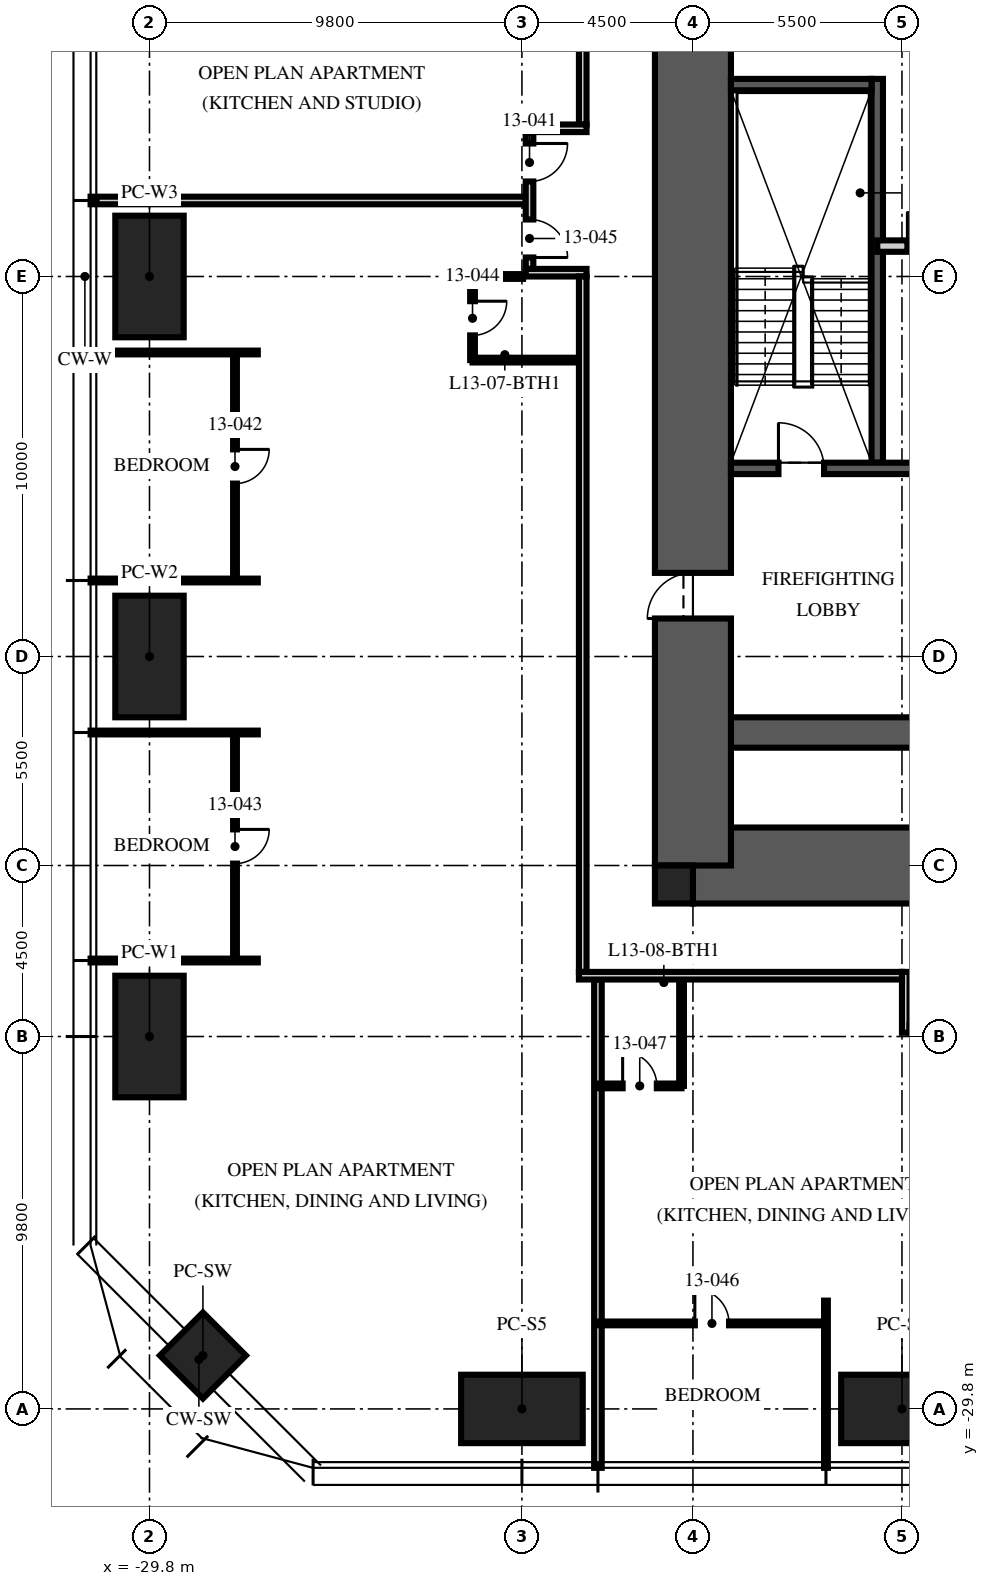
"""IFC4 building model, lengths in metres.
Left out: names, types, materials, properties, quantities, classifications, styles, units other than length and angle.
Written with IfcOpenShell. Run it as: python <this file> out.ifc"""

import sys

from ifc_helpers import new_model, si_unit, direction, frame, frame_2d, origin, origin_2d, place, context, subcontext, project, spatial, rectangle, hollow_rectangle, extrude, element, fill, save


model = new_model("IFC4")
c1 = context("Model", 3, precision=1e-05, world=origin(), true_north=direction((0.0, 1.0)))
c2 = subcontext(c1, "Body", "Model", "MODEL_VIEW")
j1 = project(units=[si_unit("LENGTHUNIT", "METRE"), si_unit("PLANEANGLEUNIT", "RADIAN")], contexts=[c1])
p1 = place(None, origin())
s1 = spatial("IfcSite", under=j1, at=p1, CompositionType="ELEMENT")
p2 = place(p1, origin())
s2 = spatial("IfcBuilding", under=s1, at=p2, CompositionType="ELEMENT")
p3 = place(p2, frame((0.0, 0.0, 54.75)))
s3 = spatial("IfcBuildingStorey", under=s2, at=p3, CompositionType="ELEMENT", Elevation=54.75)
p4 = place(p3, frame((-15.5, -15.5, -0.25), z_axis=(0.0, 0.0, 1.0), x_axis=(1.0, 0.0, 0.0)))
e1 = element("IfcWall", 1, at=p4, inside=s3, PredefinedType="SHEAR", context=c2, shape_type="SweptSolid", body=[
    extrude(rectangle(XDim=31.0, YDim=2.0, at=frame_2d((15.5, 0.0))), origin(), (0.0, 0.0, 1.0), 3.75),
])
p5 = place(p3, frame((-15.5, -12.0, -0.25), z_axis=(0.0, 0.0, 1.0), x_axis=(1.0, 0.0, 0.0)))
e2 = element("IfcWall", 2, at=p5, inside=s3, PredefinedType="SHEAR", context=c2, shape_type="SweptSolid", body=[
    extrude(rectangle(XDim=31.0, YDim=0.8, at=frame_2d((15.5, 0.0))), origin(), (0.0, 0.0, 1.0), 3.75),
])
p6 = place(p3, frame((-15.5, -15.5, -0.25), z_axis=(0.0, 0.0, 1.0), x_axis=(0.0, 1.0, 0.0)))
e3 = element("IfcWall", 3, at=p6, inside=s3, PredefinedType="SHEAR", context=c2, shape_type="SweptSolid", body=[
    extrude(rectangle(XDim=31.0, YDim=2.0, at=frame_2d((15.5, 0.0))), origin(), (0.0, 0.0, 1.0), 3.75),
])
p7 = place(p6, frame((6.5, 0.0, 0.25)))
e4 = element("IfcOpeningElement", 4, at=p7, cuts=e3, PredefinedType="OPENING", context=c2, shape_type="SweptSolid", body=[
    extrude(rectangle(XDim=1.2, YDim=2.1, at=frame_2d((0.6, 1.05))), frame((0.0, 1.01, 0.0), z_axis=(0.0, -1.0, 0.0), x_axis=(1.0, 0.0, 0.0)), (0.0, 0.0, 1.0), 2.02),
])
p8 = place(p6, frame((23.0, 0.0, 0.25)))
e5 = element("IfcOpeningElement", 5, at=p8, cuts=e3, PredefinedType="OPENING", context=c2, shape_type="SweptSolid", body=[
    extrude(rectangle(XDim=1.8, YDim=2.1, at=frame_2d((0.9, 1.05))), frame((0.0, 1.01, 0.0), z_axis=(0.0, -1.0, 0.0), x_axis=(1.0, 0.0, 0.0)), (0.0, 0.0, 1.0), 2.02),
])
p9 = place(p3, frame((-16.0, -16.0, -0.25), z_axis=(0.0, 0.0, 1.0), x_axis=(1.0, 0.0, 0.0)))
e6 = element("IfcColumn", 6, at=p9, inside=s3, PredefinedType="COLUMN", context=c2, shape_type="SweptSolid", body=[
    extrude(rectangle(XDim=1.0, YDim=1.0, at=origin_2d()), origin(), (0.0, 0.0, 1.0), 3.75),
])
for number, where, z_axis, x_axis in (
    (7, (-10.0, -29.8, 0.0), (0.0, 0.0, 1.0), (1.0, 0.0, 0.0)),
    (8, (-20.0, -29.8, 0.0), (0.0, 0.0, 1.0), (1.0, 0.0, 0.0)),
    (9, (-29.8, -20.0, 0.0), (0.0, 0.0, 1.0), (0.0, 1.0, 0.0)),
    (10, (-29.8, -10.0, 0.0), (0.0, 0.0, 1.0), (0.0, 1.0, 0.0)),
    (11, (-29.8, 0.0, 0.0), (0.0, 0.0, 1.0), (0.0, 1.0, 0.0)),
):
    element("IfcColumn", number, at=place(p3, frame(where, z_axis=z_axis, x_axis=x_axis)), inside=s3, PredefinedType="COLUMN", context=c2, shape_type="SweptSolid", body=[
        extrude(hollow_rectangle(XDim=3.2, YDim=1.8, WallThickness=0.2, at=origin_2d()), origin(), (0.0, 0.0, 1.0), 3.75),
    ])
p10 = place(p3, frame((-28.394, -28.394, 0.0), z_axis=(0.0, 0.0, 1.0), x_axis=(0.707106781187, -0.707106781187, 0.0)))
e12 = element("IfcColumn", 12, at=p10, inside=s3, PredefinedType="COLUMN", context=c2, shape_type="SweptSolid", body=[
    extrude(hollow_rectangle(XDim=1.6, YDim=1.6, WallThickness=0.1, at=origin_2d()), origin(), (0.0, 0.0, 1.0), 3.75),
])
p11 = place(p3, frame((-10.65, -4.9, 0.0), z_axis=(0.0, 0.0, 1.0), x_axis=(0.0, 1.0, 0.0)))
e13 = element("IfcWall", 13, at=p11, inside=s3, PredefinedType="SOLIDWALL", context=c2, shape_type="SweptSolid", body=[
    extrude(rectangle(XDim=10.1, YDim=0.3, at=frame_2d((5.05, 0.0))), origin(), (0.0, 0.0, 1.0), 3.5),
])
p12 = place(p3, frame((-14.5, -5.05, 0.0), z_axis=(0.0, 0.0, 1.0), x_axis=(1.0, 0.0, 0.0)))
e14 = element("IfcWall", 14, at=p12, inside=s3, PredefinedType="SOLIDWALL", context=c2, shape_type="SweptSolid", body=[
    extrude(rectangle(XDim=5.7, YDim=0.3, at=frame_2d((2.85, 0.0))), origin(), (0.0, 0.0, 1.0), 3.5),
])
p13 = place(p12, frame((1.25, 0.0, 0.0)))
e15 = element("IfcOpeningElement", 15, at=p13, cuts=e14, PredefinedType="OPENING", context=c2, shape_type="SweptSolid", body=[
    extrude(rectangle(XDim=1.2, YDim=2.1, at=frame_2d((0.6, 1.05))), frame((0.0, 0.16, 0.0), z_axis=(0.0, -1.0, 0.0), x_axis=(1.0, 0.0, 0.0)), (0.0, 0.0, 1.0), 0.32),
])
p14 = place(p3, frame((-14.5, 5.05, 0.0), z_axis=(0.0, 0.0, 1.0), x_axis=(1.0, 0.0, 0.0)))
e16 = element("IfcWall", 16, at=p14, inside=s3, PredefinedType="SOLIDWALL", context=c2, shape_type="SweptSolid", body=[
    extrude(rectangle(XDim=3.7, YDim=0.3, at=frame_2d((1.85, 0.0))), origin(), (0.0, 0.0, 1.0), 3.5),
])
p15 = place(p3, frame((-10.65, 0.8, 0.0), z_axis=(0.0, 0.0, 1.0), x_axis=(1.0, 0.0, 0.0)))
e17 = element("IfcWall", 17, at=p15, inside=s3, PredefinedType="PARTITIONING", context=c2, shape_type="SweptSolid", body=[
    extrude(rectangle(XDim=21.3, YDim=0.3, at=frame_2d((10.65, 0.0))), origin(), (0.0, 0.0, 1.0), 3.5),
])
p16 = place(p15, frame((10.05, 0.0, 0.0)))
e18 = element("IfcOpeningElement", 18, at=p16, cuts=e17, PredefinedType="OPENING", context=c2, shape_type="SweptSolid", body=[
    extrude(rectangle(XDim=1.2, YDim=2.1, at=frame_2d((0.6, 1.05))), frame((0.0, 0.16, 0.0), z_axis=(0.0, -1.0, 0.0), x_axis=(1.0, 0.0, 0.0)), (0.0, 0.0, 1.0), 0.32),
])
p17 = place(p15, frame((0.793, 0.0, 0.0)))
e19 = element("IfcOpeningElement", 19, at=p17, cuts=e17, PredefinedType="OPENING", context=c2, shape_type="SweptSolid", body=[
    extrude(rectangle(XDim=0.9, YDim=2.1, at=frame_2d((0.45, 1.05))), frame((0.0, 0.16, 0.0), z_axis=(0.0, -1.0, 0.0), x_axis=(1.0, 0.0, 0.0)), (0.0, 0.0, 1.0), 0.32),
])
p18 = place(p3, frame((-19.9, 2.0, 0.0), z_axis=(0.0, 0.0, 1.0), x_axis=(-1.0, 0.0, 0.0)))
e20 = element("IfcWall", 20, at=p18, inside=s3, PredefinedType="PARTITIONING", context=c2, shape_type="SweptSolid", body=[
    extrude(rectangle(XDim=11.45, YDim=0.2, at=frame_2d((5.725, 0.0))), origin(), (0.0, 0.0, 1.0), 2.71),
])
for number, where, z_axis, x_axis in (
    (21, (-26.95, -2.0, 0.0), (0.0, 0.0, 1.0), (-1.0, 0.0, 0.0)),
    (22, (-26.95, -8.0, 0.0), (0.0, 0.0, 1.0), (-1.0, 0.0, 0.0)),
    (23, (-26.95, -12.0, 0.0), (0.0, 0.0, 1.0), (-1.0, 0.0, 0.0)),
    (24, (-26.95, -18.0, 0.0), (0.0, 0.0, 1.0), (-1.0, 0.0, 0.0)),
):
    element("IfcWall", number, at=place(p3, frame(where, z_axis=z_axis, x_axis=x_axis)), inside=s3, PredefinedType="PARTITIONING", context=c2, shape_type="SweptSolid", body=[
        extrude(rectangle(XDim=4.4, YDim=0.1, at=frame_2d((2.2, 0.0))), origin(), (0.0, 0.0, 1.0), 2.71),
    ])
p19 = place(p3, frame((-18.0, -18.5, 0.0), z_axis=(0.0, 0.0, 1.0), x_axis=(0.0, -1.0, 0.0)))
e25 = element("IfcWall", 25, at=p19, inside=s3, PredefinedType="PARTITIONING", context=c2, shape_type="SweptSolid", body=[
    extrude(rectangle(XDim=12.85, YDim=0.2, at=frame_2d((6.425, 0.0))), origin(), (0.0, 0.0, 1.0), 2.3),
])
p20 = place(p3, frame((-12.0, -26.95, 0.0), z_axis=(0.0, 0.0, 1.0), x_axis=(0.0, -1.0, 0.0)))
e26 = element("IfcWall", 26, at=p20, inside=s3, PredefinedType="PARTITIONING", context=c2, shape_type="SweptSolid", body=[
    extrude(rectangle(XDim=4.4, YDim=0.1, at=frame_2d((2.2, 0.0))), origin(), (0.0, 0.0, 1.0), 2.71),
])
p21 = place(p3, frame((-27.55, -2.0, 0.0), z_axis=(0.0, 0.0, 1.0), x_axis=(0.0, -1.0, 0.0)))
e27 = element("IfcWall", 27, at=p21, inside=s3, PredefinedType="PARTITIONING", context=c2, shape_type="SweptSolid", body=[
    extrude(rectangle(XDim=6.0, YDim=0.1, at=frame_2d((3.0, 0.0))), origin(), (0.0, 0.0, 1.0), 2.61),
])
p22 = place(p21, frame((2.55, 0.0, 0.0)))
e28 = element("IfcOpeningElement", 28, at=p22, cuts=e27, PredefinedType="OPENING", context=c2, shape_type="SweptSolid", body=[
    extrude(rectangle(XDim=0.9, YDim=2.1, at=frame_2d((0.45, 1.05))), frame((0.0, 0.06, 0.0), z_axis=(0.0, -1.0, 0.0), x_axis=(1.0, 0.0, 0.0)), (0.0, 0.0, 1.0), 0.12),
])
p23 = place(p3, frame((-27.55, -12.0, 0.0), z_axis=(0.0, 0.0, 1.0), x_axis=(0.0, -1.0, 0.0)))
e29 = element("IfcWall", 29, at=p23, inside=s3, PredefinedType="PARTITIONING", context=c2, shape_type="SweptSolid", body=[
    extrude(rectangle(XDim=6.0, YDim=0.1, at=frame_2d((3.0, 0.0))), origin(), (0.0, 0.0, 1.0), 2.61),
])
p24 = place(p23, frame((2.55, 0.0, 0.0)))
e30 = element("IfcOpeningElement", 30, at=p24, cuts=e29, PredefinedType="OPENING", context=c2, shape_type="SweptSolid", body=[
    extrude(rectangle(XDim=0.9, YDim=2.1, at=frame_2d((0.45, 1.05))), frame((0.0, 0.06, 0.0), z_axis=(0.0, -1.0, 0.0), x_axis=(1.0, 0.0, 0.0)), (0.0, 0.0, 1.0), 0.12),
])
p25 = place(p3, frame((-21.3, 0.0, 0.0), z_axis=(0.0, 0.0, 1.0), x_axis=(0.0, -1.0, 0.0)))
e31 = element("IfcWall", 31, at=p25, inside=s3, PredefinedType="PARTITIONING", context=c2, shape_type="SweptSolid", body=[
    extrude(rectangle(XDim=2.2, YDim=0.125, at=frame_2d((1.1, 0.0))), origin(), (0.0, 0.0, 1.0), 2.492),
])
p26 = place(p25, frame((0.65, 0.0, 0.0)))
e32 = element("IfcOpeningElement", 32, at=p26, cuts=e31, PredefinedType="OPENING", context=c2, shape_type="SweptSolid", body=[
    extrude(rectangle(XDim=0.9, YDim=2.1, at=frame_2d((0.45, 1.05))), frame((0.0, 0.073, 0.0), z_axis=(0.0, -1.0, 0.0), x_axis=(1.0, 0.0, 0.0)), (0.0, 0.0, 1.0), 0.145),
])
p27 = place(p3, frame((-19.97, 0.0, 0.0), z_axis=(0.0, 0.0, 1.0), x_axis=(-1.0, 0.0, 0.0)))
e33 = element("IfcWall", 33, at=p27, inside=s3, PredefinedType="PARTITIONING", context=c2, shape_type="SweptSolid", body=[
    extrude(rectangle(XDim=1.33, YDim=0.125, at=frame_2d((0.665, 0.0))), origin(), (0.0, 0.0, 1.0), 2.492),
])
p28 = place(p3, frame((-18.5, -2.2, 0.0), z_axis=(0.0, 0.0, 1.0), x_axis=(-1.0, 0.0, 0.0)))
e34 = element("IfcWall", 34, at=p28, inside=s3, PredefinedType="PARTITIONING", context=c2, shape_type="SweptSolid", body=[
    extrude(rectangle(XDim=2.8, YDim=0.125, at=frame_2d((1.4, 0.0))), origin(), (0.0, 0.0, 1.0), 3.5),
])
p29 = place(p3, frame((-18.0, -27.55, 0.0), z_axis=(0.0, 0.0, 1.0), x_axis=(1.0, 0.0, 0.0)))
e35 = element("IfcWall", 35, at=p29, inside=s3, PredefinedType="PARTITIONING", context=c2, shape_type="SweptSolid", body=[
    extrude(rectangle(XDim=6.0, YDim=0.1, at=frame_2d((3.0, 0.0))), origin(), (0.0, 0.0, 1.0), 2.61),
])
p30 = place(p29, frame((2.55, 0.0, 0.0)))
e36 = element("IfcOpeningElement", 36, at=p30, cuts=e35, PredefinedType="OPENING", context=c2, shape_type="SweptSolid", body=[
    extrude(rectangle(XDim=0.9, YDim=2.1, at=frame_2d((0.45, 1.05))), frame((0.0, 0.06, 0.0), z_axis=(0.0, -1.0, 0.0), x_axis=(1.0, 0.0, 0.0)), (0.0, 0.0, 1.0), 0.12),
])
p31 = place(p3, frame((-18.0, -21.3, 0.0), z_axis=(0.0, 0.0, 1.0), x_axis=(1.0, 0.0, 0.0)))
e37 = element("IfcWall", 37, at=p31, inside=s3, PredefinedType="PARTITIONING", context=c2, shape_type="SweptSolid", body=[
    extrude(rectangle(XDim=2.2, YDim=0.125, at=frame_2d((1.1, 0.0))), origin(), (0.0, 0.0, 1.0), 3.5),
])
p32 = place(p31, frame((0.65, 0.0, 0.0)))
e38 = element("IfcOpeningElement", 38, at=p32, cuts=e37, PredefinedType="OPENING", context=c2, shape_type="SweptSolid", body=[
    extrude(rectangle(XDim=0.9, YDim=2.1, at=frame_2d((0.45, 1.05))), frame((0.0, 0.073, 0.0), z_axis=(0.0, -1.0, 0.0), x_axis=(1.0, 0.0, 0.0)), (0.0, 0.0, 1.0), 0.145),
])
p33 = place(p3, frame((-15.8, -18.5, 0.0), z_axis=(0.0, 0.0, 1.0), x_axis=(0.0, -1.0, 0.0)))
e39 = element("IfcWall", 39, at=p33, inside=s3, PredefinedType="PARTITIONING", context=c2, shape_type="SweptSolid", body=[
    extrude(rectangle(XDim=2.8, YDim=0.125, at=frame_2d((1.4, 0.0))), origin(), (0.0, 0.0, 1.0), 3.5),
])
p34 = place(p3, frame((-18.4, 18.3, 0.0), z_axis=(0.0, 0.0, 1.0), x_axis=(0.0, -1.0, 0.0)))
e40 = element("IfcWall", 40, at=p34, inside=s3, PredefinedType="PARTITIONING", context=c2, shape_type="SweptSolid", body=[
    extrude(rectangle(XDim=14.3, YDim=0.2, at=frame_2d((7.15, 0.0))), origin(), (0.0, 0.0, 1.0), 2.3),
])
p35 = place(p34, frame((8.7, 0.0, 0.0)))
e41 = element("IfcOpeningElement", 41, at=p35, cuts=e40, PredefinedType="OPENING", context=c2, shape_type="SweptSolid", body=[
    extrude(rectangle(XDim=1.0, YDim=2.2, at=frame_2d((0.5, 1.1))), frame((0.0, 0.11, 0.0), z_axis=(0.0, -1.0, 0.0), x_axis=(1.0, 0.0, 0.0)), (0.0, 0.0, 1.0), 0.22),
])
p36 = place(p3, frame((-18.3, 3.9, 0.0), z_axis=(0.0, 0.0, 1.0), x_axis=(-1.0, 0.0, 0.0)))
e42 = element("IfcWall", 42, at=p36, inside=s3, PredefinedType="PARTITIONING", context=c2, shape_type="SweptSolid", body=[
    extrude(rectangle(XDim=1.6, YDim=0.2, at=frame_2d((0.8, 0.0))), origin(), (0.0, 0.0, 1.0), 3.5),
])
p37 = place(p3, frame((-18.3, 0.1, 0.0), z_axis=(0.0, 0.0, 1.0), x_axis=(-1.0, 0.0, 0.0)))
e43 = element("IfcWall", 43, at=p37, inside=s3, PredefinedType="PARTITIONING", context=c2, shape_type="SweptSolid", body=[
    extrude(rectangle(XDim=1.6, YDim=0.2, at=frame_2d((0.8, 0.0))), origin(), (0.0, 0.0, 1.0), 2.492),
])
p38 = place(p3, frame((-19.8, 3.8, 0.0), z_axis=(0.0, 0.0, 1.0), x_axis=(0.0, -1.0, 0.0)))
e44 = element("IfcWall", 44, at=p38, inside=s3, PredefinedType="PARTITIONING", context=c2, shape_type="SweptSolid", body=[
    extrude(rectangle(XDim=3.6, YDim=0.2, at=frame_2d((1.8, 0.0))), origin(), (0.0, 0.0, 1.0), 3.5),
])
p39 = place(p38, frame((0.3, 0.0, 0.0)))
e45 = element("IfcOpeningElement", 45, at=p39, cuts=e44, PredefinedType="OPENING", context=c2, shape_type="SweptSolid", body=[
    extrude(rectangle(XDim=1.0, YDim=2.2, at=frame_2d((0.5, 1.1))), frame((0.0, 0.11, 0.0), z_axis=(0.0, -1.0, 0.0), x_axis=(1.0, 0.0, 0.0)), (0.0, 0.0, 1.0), 0.22),
])
p40 = place(p38, frame((2.3, 0.0, 0.0)))
e46 = element("IfcOpeningElement", 46, at=p40, cuts=e44, PredefinedType="OPENING", context=c2, shape_type="SweptSolid", body=[
    extrude(rectangle(XDim=1.0, YDim=2.2, at=frame_2d((0.5, 1.1))), frame((0.0, 0.11, 0.0), z_axis=(0.0, -1.0, 0.0), x_axis=(1.0, 0.0, 0.0)), (0.0, 0.0, 1.0), 0.22),
])
p41 = place(p3, frame((-18.4, 0.0, 0.0), z_axis=(0.0, 0.0, 1.0), x_axis=(0.0, -1.0, 0.0)))
e47 = element("IfcWall", 47, at=p41, inside=s3, PredefinedType="PARTITIONING", context=c2, shape_type="SweptSolid", body=[
    extrude(rectangle(XDim=18.3, YDim=0.2, at=frame_2d((9.15, 0.0))), origin(), (0.0, 0.0, 1.0), 2.3),
])
p42 = place(p3, frame((-9.9, -18.3, 0.0), z_axis=(0.0, 0.0, 1.0), x_axis=(0.0, -1.0, 0.0)))
e48 = element("IfcWall", 48, at=p42, inside=s3, PredefinedType="PARTITIONING", context=c2, shape_type="SweptSolid", body=[
    extrude(rectangle(XDim=1.6, YDim=0.2, at=frame_2d((0.8, 0.0))), origin(), (0.0, 0.0, 1.0), 2.492),
])
p43 = place(p3, frame((-10.0, -18.4, 0.0), z_axis=(0.0, 0.0, 1.0), x_axis=(-1.0, 0.0, 0.0)))
e49 = element("IfcWall", 49, at=p43, inside=s3, PredefinedType="PARTITIONING", context=c2, shape_type="SweptSolid", body=[
    extrude(rectangle(XDim=8.5, YDim=0.2, at=frame_2d((4.25, 0.0))), origin(), (0.0, 0.0, 1.0), 2.3),
])
p44 = place(p13, origin())
e50 = element("IfcDoor", 50, at=p44, inside=s3, OperationType="SINGLE_SWING_LEFT", PredefinedType="DOOR", context=c2, shape_type="SweptSolid", body=[
    extrude(rectangle(XDim=1.2, YDim=2.1, at=frame_2d((0.6, 1.05))), frame((0.0, 0.025, 0.0), z_axis=(0.0, -1.0, 0.0), x_axis=(1.0, 0.0, 0.0)), (0.0, 0.0, 1.0), 0.05),
])
fill(e15, e50)
p45 = place(p7, origin())
e51 = element("IfcDoor", 51, at=p45, inside=s3, OperationType="SINGLE_SWING_LEFT", PredefinedType="DOOR", context=c2, shape_type="SweptSolid", body=[
    extrude(rectangle(XDim=1.2, YDim=2.1, at=frame_2d((0.6, 1.05))), frame((0.0, 0.025, 0.0), z_axis=(0.0, -1.0, 0.0), x_axis=(1.0, 0.0, 0.0)), (0.0, 0.0, 1.0), 0.05),
])
fill(e4, e51)
p46 = place(p17, origin())
e52 = element("IfcDoor", 52, at=p46, inside=s3, OperationType="SINGLE_SWING_LEFT", PredefinedType="DOOR", context=c2, shape_type="SweptSolid", body=[
    extrude(rectangle(XDim=0.9, YDim=2.1, at=frame_2d((0.45, 1.05))), frame((0.0, 0.025, 0.0), z_axis=(0.0, -1.0, 0.0), x_axis=(1.0, 0.0, 0.0)), (0.0, 0.0, 1.0), 0.05),
])
fill(e19, e52)
p47 = place(p39, origin())
e53 = element("IfcDoor", 53, at=p47, inside=s3, OperationType="SINGLE_SWING_LEFT", PredefinedType="DOOR", context=c2, shape_type="SweptSolid", body=[
    extrude(rectangle(XDim=1.0, YDim=2.2, at=frame_2d((0.5, 1.1))), frame((0.0, 0.025, 0.0), z_axis=(0.0, -1.0, 0.0), x_axis=(1.0, 0.0, 0.0)), (0.0, 0.0, 1.0), 0.05),
])
fill(e45, e53)
p48 = place(p22, origin())
e54 = element("IfcDoor", 54, at=p48, inside=s3, OperationType="SINGLE_SWING_LEFT", PredefinedType="DOOR", context=c2, shape_type="SweptSolid", body=[
    extrude(rectangle(XDim=0.9, YDim=2.1, at=frame_2d((0.45, 1.05))), frame((0.0, 0.025, 0.0), z_axis=(0.0, -1.0, 0.0), x_axis=(1.0, 0.0, 0.0)), (0.0, 0.0, 1.0), 0.05),
])
fill(e28, e54)
p49 = place(p24, origin())
e55 = element("IfcDoor", 55, at=p49, inside=s3, OperationType="SINGLE_SWING_LEFT", PredefinedType="DOOR", context=c2, shape_type="SweptSolid", body=[
    extrude(rectangle(XDim=0.9, YDim=2.1, at=frame_2d((0.45, 1.05))), frame((0.0, 0.025, 0.0), z_axis=(0.0, -1.0, 0.0), x_axis=(1.0, 0.0, 0.0)), (0.0, 0.0, 1.0), 0.05),
])
fill(e30, e55)
p50 = place(p26, origin())
e56 = element("IfcDoor", 56, at=p50, inside=s3, OperationType="SINGLE_SWING_LEFT", PredefinedType="DOOR", context=c2, shape_type="SweptSolid", body=[
    extrude(rectangle(XDim=0.9, YDim=2.1, at=frame_2d((0.45, 1.05))), frame((0.0, 0.025, 0.0), z_axis=(0.0, -1.0, 0.0), x_axis=(1.0, 0.0, 0.0)), (0.0, 0.0, 1.0), 0.05),
])
fill(e32, e56)
p51 = place(p40, origin())
e57 = element("IfcDoor", 57, at=p51, inside=s3, OperationType="SINGLE_SWING_RIGHT", PredefinedType="DOOR", context=c2, shape_type="SweptSolid", body=[
    extrude(rectangle(XDim=1.0, YDim=2.2, at=frame_2d((0.5, 1.1))), frame((0.0, 0.025, 0.0), z_axis=(0.0, -1.0, 0.0), x_axis=(1.0, 0.0, 0.0)), (0.0, 0.0, 1.0), 0.05),
])
fill(e46, e57)
p52 = place(p30, origin())
e58 = element("IfcDoor", 58, at=p52, inside=s3, OperationType="SINGLE_SWING_LEFT", PredefinedType="DOOR", context=c2, shape_type="SweptSolid", body=[
    extrude(rectangle(XDim=0.9, YDim=2.1, at=frame_2d((0.45, 1.05))), frame((0.0, 0.025, 0.0), z_axis=(0.0, -1.0, 0.0), x_axis=(1.0, 0.0, 0.0)), (0.0, 0.0, 1.0), 0.05),
])
fill(e36, e58)
p53 = place(p32, origin())
e59 = element("IfcDoor", 59, at=p53, inside=s3, OperationType="SINGLE_SWING_LEFT", PredefinedType="DOOR", context=c2, shape_type="SweptSolid", body=[
    extrude(rectangle(XDim=0.9, YDim=2.1, at=frame_2d((0.45, 1.05))), frame((0.0, 0.025, 0.0), z_axis=(0.0, -1.0, 0.0), x_axis=(1.0, 0.0, 0.0)), (0.0, 0.0, 1.0), 0.05),
])
fill(e38, e59)
save(model, sys.argv[1])
